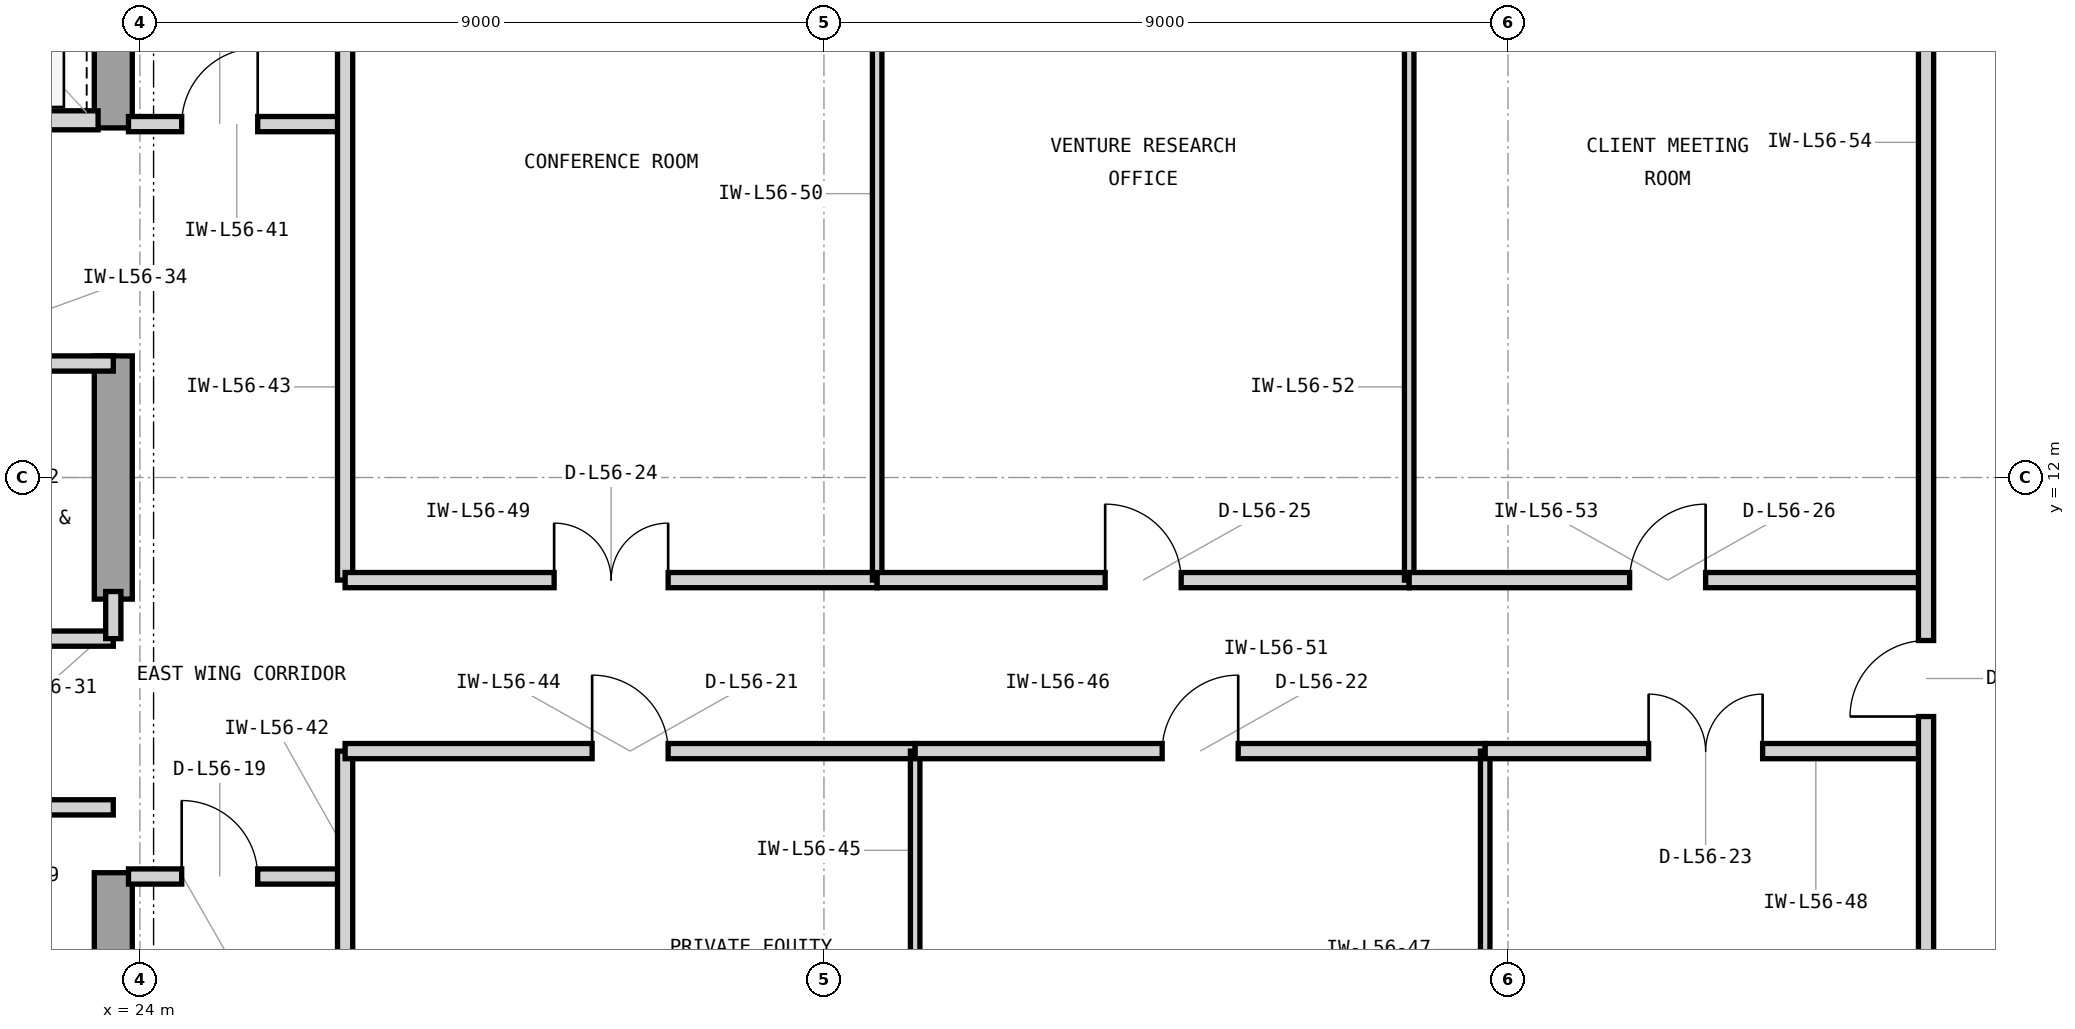
"""IFC4 building model, lengths in metres.
Left out: names, types, materials, properties, quantities, classifications, styles, units other than length and angle.
Written with IfcOpenShell. Run it as: python <this file> out.ifc"""

import sys

from ifc_helpers import new_model, si_unit, direction, frame, frame_2d, origin, place, context, subcontext, project, spatial, rectangle, extrude, element, fill, save


model = new_model("IFC4")
c1 = context("Model", 3, precision=1e-05, world=origin(), true_north=direction((0.0, 1.0)))
c2 = subcontext(c1, "Body", "Model", "MODEL_VIEW")
j1 = project(units=[si_unit("LENGTHUNIT", "METRE"), si_unit("PLANEANGLEUNIT", "RADIAN")], contexts=[c1])
p1 = place(None, origin())
s1 = spatial("IfcSite", under=j1, at=p1, CompositionType="ELEMENT")
p2 = place(p1, origin())
s2 = spatial("IfcBuilding", under=s1, at=p2, CompositionType="ELEMENT")
p3 = place(p2, frame((0.0, 0.0, 231.3)))
s3 = spatial("IfcBuildingStorey", under=s2, at=p3, CompositionType="ELEMENT", Elevation=231.3)
p4 = place(p3, frame((23.65, 3.6, 0.0), z_axis=(0.0, 0.0, 1.0), x_axis=(0.0, 1.0, 0.0)))
e1 = element("IfcWall", 1, at=p4, inside=s3, PredefinedType="SHEAR", context=c2, shape_type="SweptSolid", body=[
    extrude(rectangle(XDim=3.2, YDim=0.5, at=frame_2d((1.6, 0.0))), origin(), (0.0, 0.0, 1.0), 3.9),
])
p5 = place(p3, frame((23.65, 10.4, 0.0), z_axis=(0.0, 0.0, 1.0), x_axis=(0.0, 1.0, 0.0)))
e2 = element("IfcWall", 2, at=p5, inside=s3, PredefinedType="SHEAR", context=c2, shape_type="SweptSolid", body=[
    extrude(rectangle(XDim=3.2, YDim=0.5, at=frame_2d((1.6, 0.0))), origin(), (0.0, 0.0, 1.0), 3.9),
])
p6 = place(p3, frame((23.65, 16.6, 0.0), z_axis=(0.0, 0.0, 1.0), x_axis=(0.0, 1.0, 0.0)))
e3 = element("IfcWall", 3, at=p6, inside=s3, PredefinedType="SHEAR", context=c2, shape_type="SweptSolid", body=[
    extrude(rectangle(XDim=4.05, YDim=0.5, at=frame_2d((2.025, 0.0))), origin(), (0.0, 0.0, 1.0), 3.9),
])
p7 = place(p3, frame((21.05, 16.7, 0.0), z_axis=(0.0, 0.0, 1.0), x_axis=(1.0, 0.0, 0.0)))
e4 = element("IfcWall", 4, at=p7, inside=s3, PredefinedType="PARTITIONING", context=c2, shape_type="SweptSolid", body=[
    extrude(rectangle(XDim=2.4, YDim=0.25, at=frame_2d((1.2, 0.0))), origin(), (0.0, 0.0, 1.0), 3.073),
])
p8 = place(p7, frame((0.52, 0.0, 0.0)))
e5 = element("IfcOpeningElement", 5, at=p8, cuts=e4, PredefinedType="OPENING", context=c2, shape_type="SweptSolid", body=[
    extrude(rectangle(XDim=1.15, YDim=2.25, at=frame_2d((0.575, 1.125))), frame((0.0, 0.135, 0.0), z_axis=(0.0, -1.0, 0.0), x_axis=(1.0, 0.0, 0.0)), (0.0, 0.0, 1.0), 0.27),
])
p9 = place(p3, frame((20.85, 7.66, 0.0), z_axis=(0.0, 0.0, 1.0), x_axis=(1.0, 0.0, 0.0)))
e6 = element("IfcWall", 6, at=p9, inside=s3, PredefinedType="PARTITIONING", context=c2, shape_type="SweptSolid", body=[
    extrude(rectangle(XDim=2.8, YDim=0.2, at=frame_2d((1.4, 0.0))), origin(), (0.0, 0.0, 1.0), 3.69),
])
p10 = place(p9, frame((0.95, 0.0, 0.0)))
e7 = element("IfcOpeningElement", 7, at=p10, cuts=e6, PredefinedType="OPENING", context=c2, shape_type="SweptSolid", body=[
    extrude(rectangle(XDim=0.9, YDim=2.1, at=frame_2d((0.45, 1.05))), frame((0.0, 0.11, 0.0), z_axis=(0.0, -1.0, 0.0), x_axis=(1.0, 0.0, 0.0)), (0.0, 0.0, 1.0), 0.22),
])
p11 = place(p3, frame((14.825, 9.88, 0.0), z_axis=(0.0, 0.0, 1.0), x_axis=(1.0, 0.0, 0.0)))
e8 = element("IfcWall", 8, at=p11, inside=s3, PredefinedType="PARTITIONING", context=c2, shape_type="SweptSolid", body=[
    extrude(rectangle(XDim=8.825, YDim=0.2, at=frame_2d((4.413, 0.0))), origin(), (0.0, 0.0, 1.0), 3.69),
])
p12 = place(p3, frame((23.65, 9.88, 0.0), z_axis=(0.0, 0.0, 1.0), x_axis=(0.0, 1.0, 0.0)))
e9 = element("IfcWall", 9, at=p12, inside=s3, PredefinedType="PARTITIONING", context=c2, shape_type="SweptSolid", body=[
    extrude(rectangle(XDim=0.62, YDim=0.2, at=frame_2d((0.31, 0.0))), origin(), (0.0, 0.0, 1.0), 3.69),
])
p13 = place(p3, frame((19.9, 13.5, 0.0), z_axis=(0.0, 0.0, 1.0), x_axis=(1.0, 0.0, 0.0)))
e10 = element("IfcWall", 10, at=p13, inside=s3, PredefinedType="PARTITIONING", context=c2, shape_type="SweptSolid", body=[
    extrude(rectangle(XDim=3.75, YDim=0.2, at=frame_2d((1.875, 0.0))), origin(), (0.0, 0.0, 1.0), 3.073),
])
p14 = place(p13, frame((1.4, 0.0, 0.0)))
e11 = element("IfcOpeningElement", 11, at=p14, cuts=e10, PredefinedType="OPENING", context=c2, shape_type="SweptSolid", body=[
    extrude(rectangle(XDim=0.95, YDim=2.1, at=frame_2d((0.475, 1.05))), frame((0.0, 0.11, 0.0), z_axis=(0.0, -1.0, 0.0), x_axis=(1.0, 0.0, 0.0)), (0.0, 0.0, 1.0), 0.22),
])
p15 = place(p3, frame((23.85, 6.75, 0.0), z_axis=(0.0, 0.0, 1.0), x_axis=(1.0, 0.0, 0.0)))
e12 = element("IfcWall", 12, at=p15, inside=s3, PredefinedType="PARTITIONING", context=c2, shape_type="SweptSolid", body=[
    extrude(rectangle(XDim=2.85, YDim=0.2, at=frame_2d((1.425, 0.0))), origin(), (0.0, 0.0, 1.0), 3.69),
])
p16 = place(p15, frame((0.7, 0.0, 0.0)))
e13 = element("IfcOpeningElement", 13, at=p16, cuts=e12, PredefinedType="OPENING", context=c2, shape_type="SweptSolid", body=[
    extrude(rectangle(XDim=1.0, YDim=2.15, at=frame_2d((0.5, 1.075))), frame((0.0, 0.11, 0.0), z_axis=(0.0, -1.0, 0.0), x_axis=(1.0, 0.0, 0.0)), (0.0, 0.0, 1.0), 0.22),
])
p17 = place(p3, frame((23.85, 16.65, 0.0), z_axis=(0.0, 0.0, 1.0), x_axis=(1.0, 0.0, 0.0)))
e14 = element("IfcWall", 14, at=p17, inside=s3, PredefinedType="PARTITIONING", context=c2, shape_type="SweptSolid", body=[
    extrude(rectangle(XDim=2.85, YDim=0.2, at=frame_2d((1.425, 0.0))), origin(), (0.0, 0.0, 1.0), 3.69),
])
p18 = place(p17, frame((0.7, 0.0, 0.0)))
e15 = element("IfcOpeningElement", 15, at=p18, cuts=e14, PredefinedType="OPENING", context=c2, shape_type="SweptSolid", body=[
    extrude(rectangle(XDim=1.0, YDim=2.15, at=frame_2d((0.5, 1.075))), frame((0.0, 0.11, 0.0), z_axis=(0.0, -1.0, 0.0), x_axis=(1.0, 0.0, 0.0)), (0.0, 0.0, 1.0), 0.22),
])
p19 = place(p3, frame((26.7, 3.18, 0.0), z_axis=(0.0, 0.0, 1.0), x_axis=(0.0, 1.0, 0.0)))
e16 = element("IfcWall", 16, at=p19, inside=s3, PredefinedType="PARTITIONING", context=c2, shape_type="SweptSolid", body=[
    extrude(rectangle(XDim=5.22, YDim=0.2, at=frame_2d((2.61, 0.0))), origin(), (0.0, 0.0, 1.0), 3.69),
])
p20 = place(p3, frame((26.7, 10.65, 0.0), z_axis=(0.0, 0.0, 1.0), x_axis=(0.0, 1.0, 0.0)))
e17 = element("IfcWall", 17, at=p20, inside=s3, PredefinedType="PARTITIONING", context=c2, shape_type="SweptSolid", body=[
    extrude(rectangle(XDim=10.17, YDim=0.2, at=frame_2d((5.085, 0.0))), origin(), (0.0, 0.0, 1.0), 3.69),
])
p21 = place(p3, frame((26.7, 8.4, 0.0), z_axis=(0.0, 0.0, 1.0), x_axis=(1.0, 0.0, 0.0)))
e18 = element("IfcWall", 18, at=p21, inside=s3, PredefinedType="PARTITIONING", context=c2, shape_type="SweptSolid", body=[
    extrude(rectangle(XDim=7.5, YDim=0.2, at=frame_2d((3.75, 0.0))), origin(), (0.0, 0.0, 1.0), 3.69),
])
p22 = place(p21, frame((3.25, 0.0, 0.0)))
e19 = element("IfcOpeningElement", 19, at=p22, cuts=e18, PredefinedType="OPENING", context=c2, shape_type="SweptSolid", body=[
    extrude(rectangle(XDim=1.0, YDim=2.15, at=frame_2d((0.5, 1.075))), frame((0.0, 0.11, 0.0), z_axis=(0.0, -1.0, 0.0), x_axis=(1.0, 0.0, 0.0)), (0.0, 0.0, 1.0), 0.22),
])
p23 = place(p3, frame((34.2, 3.18, 0.0), z_axis=(0.0, 0.0, 1.0), x_axis=(0.0, 1.0, 0.0)))
e20 = element("IfcWall", 20, at=p23, inside=s3, PredefinedType="PARTITIONING", context=c2, shape_type="SweptSolid", body=[
    extrude(rectangle(XDim=5.22, YDim=0.125, at=frame_2d((2.61, 0.0))), origin(), (0.0, 0.0, 1.0), 3.69),
])
p24 = place(p3, frame((34.2, 8.4, 0.0), z_axis=(0.0, 0.0, 1.0), x_axis=(1.0, 0.0, 0.0)))
e21 = element("IfcWall", 21, at=p24, inside=s3, PredefinedType="PARTITIONING", context=c2, shape_type="SweptSolid", body=[
    extrude(rectangle(XDim=7.5, YDim=0.2, at=frame_2d((3.75, 0.0))), origin(), (0.0, 0.0, 1.0), 3.69),
])
p25 = place(p24, frame((3.25, 0.0, 0.0)))
e22 = element("IfcOpeningElement", 22, at=p25, cuts=e21, PredefinedType="OPENING", context=c2, shape_type="SweptSolid", body=[
    extrude(rectangle(XDim=1.0, YDim=2.15, at=frame_2d((0.5, 1.075))), frame((0.0, 0.11, 0.0), z_axis=(0.0, -1.0, 0.0), x_axis=(1.0, 0.0, 0.0)), (0.0, 0.0, 1.0), 0.22),
])
p26 = place(p3, frame((41.7, 3.18, 0.0), z_axis=(0.0, 0.0, 1.0), x_axis=(0.0, 1.0, 0.0)))
e23 = element("IfcWall", 23, at=p26, inside=s3, PredefinedType="PARTITIONING", context=c2, shape_type="SweptSolid", body=[
    extrude(rectangle(XDim=5.22, YDim=0.125, at=frame_2d((2.61, 0.0))), origin(), (0.0, 0.0, 1.0), 3.69),
])
p27 = place(p3, frame((41.7, 8.4, 0.0), z_axis=(0.0, 0.0, 1.0), x_axis=(1.0, 0.0, 0.0)))
e24 = element("IfcWall", 24, at=p27, inside=s3, PredefinedType="PARTITIONING", context=c2, shape_type="SweptSolid", body=[
    extrude(rectangle(XDim=5.8, YDim=0.2, at=frame_2d((2.9, 0.0))), origin(), (0.0, 0.0, 1.0), 3.69),
])
p28 = place(p27, frame((2.15, 0.0, 0.0)))
e25 = element("IfcOpeningElement", 25, at=p28, cuts=e24, PredefinedType="OPENING", context=c2, shape_type="SweptSolid", body=[
    extrude(rectangle(XDim=1.5, YDim=2.3, at=frame_2d((0.75, 1.15))), frame((0.0, 0.11, 0.0), z_axis=(0.0, -1.0, 0.0), x_axis=(1.0, 0.0, 0.0)), (0.0, 0.0, 1.0), 0.22),
])
p29 = place(p3, frame((26.7, 10.65, 0.0), z_axis=(0.0, 0.0, 1.0), x_axis=(1.0, 0.0, 0.0)))
e26 = element("IfcWall", 26, at=p29, inside=s3, PredefinedType="PARTITIONING", context=c2, shape_type="SweptSolid", body=[
    extrude(rectangle(XDim=7.0, YDim=0.2, at=frame_2d((3.5, 0.0))), origin(), (0.0, 0.0, 1.0), 3.69),
])
p30 = place(p29, frame((2.75, 0.0, 0.0)))
e27 = element("IfcOpeningElement", 27, at=p30, cuts=e26, PredefinedType="OPENING", context=c2, shape_type="SweptSolid", body=[
    extrude(rectangle(XDim=1.5, YDim=2.3, at=frame_2d((0.75, 1.15))), frame((0.0, 0.11, 0.0), z_axis=(0.0, -1.0, 0.0), x_axis=(1.0, 0.0, 0.0)), (0.0, 0.0, 1.0), 0.22),
])
p31 = place(p3, frame((33.7, 10.65, 0.0), z_axis=(0.0, 0.0, 1.0), x_axis=(0.0, 1.0, 0.0)))
e28 = element("IfcWall", 28, at=p31, inside=s3, PredefinedType="PARTITIONING", context=c2, shape_type="SweptSolid", body=[
    extrude(rectangle(XDim=10.17, YDim=0.125, at=frame_2d((5.085, 0.0))), origin(), (0.0, 0.0, 1.0), 3.69),
])
p32 = place(p3, frame((33.7, 10.65, 0.0), z_axis=(0.0, 0.0, 1.0), x_axis=(1.0, 0.0, 0.0)))
e29 = element("IfcWall", 29, at=p32, inside=s3, PredefinedType="PARTITIONING", context=c2, shape_type="SweptSolid", body=[
    extrude(rectangle(XDim=7.0, YDim=0.2, at=frame_2d((3.5, 0.0))), origin(), (0.0, 0.0, 1.0), 3.69),
])
p33 = place(p32, frame((3.0, 0.0, 0.0)))
e30 = element("IfcOpeningElement", 30, at=p33, cuts=e29, PredefinedType="OPENING", context=c2, shape_type="SweptSolid", body=[
    extrude(rectangle(XDim=1.0, YDim=2.15, at=frame_2d((0.5, 1.075))), frame((0.0, 0.11, 0.0), z_axis=(0.0, -1.0, 0.0), x_axis=(1.0, 0.0, 0.0)), (0.0, 0.0, 1.0), 0.22),
])
p34 = place(p3, frame((40.7, 10.65, 0.0), z_axis=(0.0, 0.0, 1.0), x_axis=(0.0, 1.0, 0.0)))
e31 = element("IfcWall", 31, at=p34, inside=s3, PredefinedType="PARTITIONING", context=c2, shape_type="SweptSolid", body=[
    extrude(rectangle(XDim=10.17, YDim=0.125, at=frame_2d((5.085, 0.0))), origin(), (0.0, 0.0, 1.0), 3.69),
])
p35 = place(p3, frame((40.7, 10.65, 0.0), z_axis=(0.0, 0.0, 1.0), x_axis=(1.0, 0.0, 0.0)))
e32 = element("IfcWall", 32, at=p35, inside=s3, PredefinedType="PARTITIONING", context=c2, shape_type="SweptSolid", body=[
    extrude(rectangle(XDim=6.8, YDim=0.2, at=frame_2d((3.4, 0.0))), origin(), (0.0, 0.0, 1.0), 3.69),
])
p36 = place(p35, frame((2.9, 0.0, 0.0)))
e33 = element("IfcOpeningElement", 33, at=p36, cuts=e32, PredefinedType="OPENING", context=c2, shape_type="SweptSolid", body=[
    extrude(rectangle(XDim=1.0, YDim=2.15, at=frame_2d((0.5, 1.075))), frame((0.0, 0.11, 0.0), z_axis=(0.0, -1.0, 0.0), x_axis=(1.0, 0.0, 0.0)), (0.0, 0.0, 1.0), 0.22),
])
p37 = place(p3, frame((47.5, 3.18, 0.0), z_axis=(0.0, 0.0, 1.0), x_axis=(0.0, 1.0, 0.0)))
e34 = element("IfcWall", 34, at=p37, inside=s3, PredefinedType="PARTITIONING", context=c2, shape_type="SweptSolid", body=[
    extrude(rectangle(XDim=17.64, YDim=0.2, at=frame_2d((8.82, 0.0))), origin(), (0.0, 0.0, 1.0), 3.69),
])
p38 = place(p37, frame((5.675, 0.0, 0.0)))
e35 = element("IfcOpeningElement", 35, at=p38, cuts=e34, PredefinedType="OPENING", context=c2, shape_type="SweptSolid", body=[
    extrude(rectangle(XDim=1.0, YDim=2.15, at=frame_2d((0.5, 1.075))), frame((0.0, 0.11, 0.0), z_axis=(0.0, -1.0, 0.0), x_axis=(1.0, 0.0, 0.0)), (0.0, 0.0, 1.0), 0.22),
])
p39 = place(p16, origin())
e36 = element("IfcDoor", 36, at=p39, inside=s3, OperationType="SINGLE_SWING_LEFT", PredefinedType="DOOR", context=c2, shape_type="SweptSolid", body=[
    extrude(rectangle(XDim=1.0, YDim=2.15, at=frame_2d((0.5, 1.075))), frame((0.0, 0.025, 0.0), z_axis=(0.0, -1.0, 0.0), x_axis=(1.0, 0.0, 0.0)), (0.0, 0.0, 1.0), 0.05),
])
fill(e13, e36)
p40 = place(p18, origin())
e37 = element("IfcDoor", 37, at=p40, inside=s3, OperationType="SINGLE_SWING_RIGHT", PredefinedType="DOOR", context=c2, shape_type="SweptSolid", body=[
    extrude(rectangle(XDim=1.0, YDim=2.15, at=frame_2d((0.5, 1.075))), frame((0.0, 0.025, 0.0), z_axis=(0.0, -1.0, 0.0), x_axis=(1.0, 0.0, 0.0)), (0.0, 0.0, 1.0), 0.05),
])
fill(e15, e37)
p41 = place(p22, origin())
e38 = element("IfcDoor", 38, at=p41, inside=s3, OperationType="SINGLE_SWING_LEFT", PredefinedType="DOOR", context=c2, shape_type="SweptSolid", body=[
    extrude(rectangle(XDim=1.0, YDim=2.15, at=frame_2d((0.5, 1.075))), frame((0.0, 0.025, 0.0), z_axis=(0.0, -1.0, 0.0), x_axis=(1.0, 0.0, 0.0)), (0.0, 0.0, 1.0), 0.05),
])
fill(e19, e38)
p42 = place(p25, origin())
e39 = element("IfcDoor", 39, at=p42, inside=s3, OperationType="SINGLE_SWING_RIGHT", PredefinedType="DOOR", context=c2, shape_type="SweptSolid", body=[
    extrude(rectangle(XDim=1.0, YDim=2.15, at=frame_2d((0.5, 1.075))), frame((0.0, 0.025, 0.0), z_axis=(0.0, -1.0, 0.0), x_axis=(1.0, 0.0, 0.0)), (0.0, 0.0, 1.0), 0.05),
])
fill(e22, e39)
p43 = place(p28, origin())
e40 = element("IfcDoor", 40, at=p43, inside=s3, OperationType="DOUBLE_DOOR_SINGLE_SWING", PredefinedType="DOOR", context=c2, shape_type="SweptSolid", body=[
    extrude(rectangle(XDim=1.5, YDim=2.3, at=frame_2d((0.75, 1.15))), frame((0.0, 0.025, 0.0), z_axis=(0.0, -1.0, 0.0), x_axis=(1.0, 0.0, 0.0)), (0.0, 0.0, 1.0), 0.05),
])
fill(e25, e40)
p44 = place(p30, origin())
e41 = element("IfcDoor", 41, at=p44, inside=s3, OperationType="DOUBLE_DOOR_SINGLE_SWING", PredefinedType="DOOR", context=c2, shape_type="SweptSolid", body=[
    extrude(rectangle(XDim=1.5, YDim=2.3, at=frame_2d((0.75, 1.15))), frame((0.0, 0.025, 0.0), z_axis=(0.0, -1.0, 0.0), x_axis=(1.0, 0.0, 0.0)), (0.0, 0.0, 1.0), 0.05),
])
fill(e27, e41)
p45 = place(p33, origin())
e42 = element("IfcDoor", 42, at=p45, inside=s3, OperationType="SINGLE_SWING_LEFT", PredefinedType="DOOR", context=c2, shape_type="SweptSolid", body=[
    extrude(rectangle(XDim=1.0, YDim=2.15, at=frame_2d((0.5, 1.075))), frame((0.0, 0.025, 0.0), z_axis=(0.0, -1.0, 0.0), x_axis=(1.0, 0.0, 0.0)), (0.0, 0.0, 1.0), 0.05),
])
fill(e30, e42)
p46 = place(p36, origin())
e43 = element("IfcDoor", 43, at=p46, inside=s3, OperationType="SINGLE_SWING_RIGHT", PredefinedType="DOOR", context=c2, shape_type="SweptSolid", body=[
    extrude(rectangle(XDim=1.0, YDim=2.15, at=frame_2d((0.5, 1.075))), frame((0.0, 0.025, 0.0), z_axis=(0.0, -1.0, 0.0), x_axis=(1.0, 0.0, 0.0)), (0.0, 0.0, 1.0), 0.05),
])
fill(e33, e43)
p47 = place(p38, origin())
e44 = element("IfcDoor", 44, at=p47, inside=s3, OperationType="SINGLE_SWING_LEFT", PredefinedType="DOOR", context=c2, shape_type="SweptSolid", body=[
    extrude(rectangle(XDim=1.0, YDim=2.15, at=frame_2d((0.5, 1.075))), frame((0.0, 0.025, 0.0), z_axis=(0.0, -1.0, 0.0), x_axis=(1.0, 0.0, 0.0)), (0.0, 0.0, 1.0), 0.05),
])
fill(e35, e44)
save(model, sys.argv[1])
